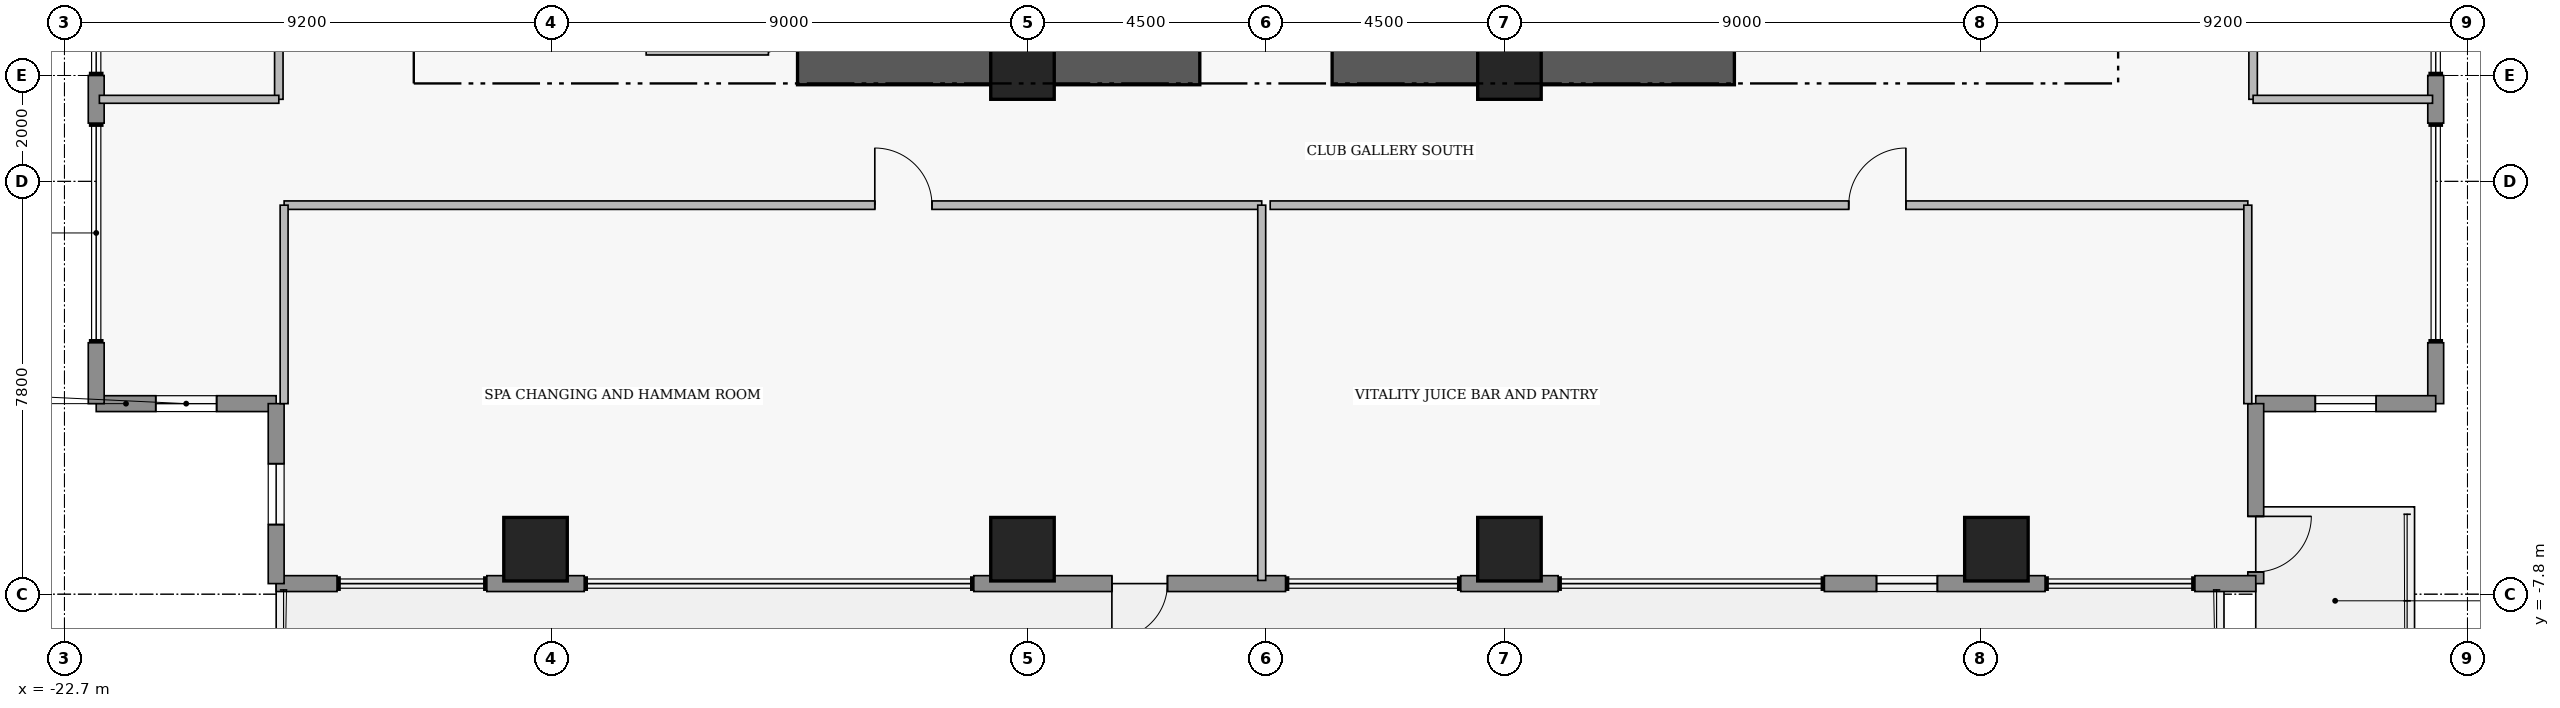
"""IFC4 building model, lengths in metres.
Left out: names, types, materials, properties, quantities, classifications, styles, units other than length and angle.
Written with IfcOpenShell. Run it as: python <this file> out.ifc"""

import sys

from ifc_helpers import new_model, si_unit, direction, frame, frame_2d, origin, origin_2d, place, context, subcontext, project, spatial, rectangle, extrude, element, fill, save


model = new_model("IFC4")
c1 = context("Model", 3, precision=1e-05, world=origin(), true_north=direction((0.0, 1.0)))
c2 = subcontext(c1, "Body", "Model", "MODEL_VIEW")
j1 = project(units=[si_unit("LENGTHUNIT", "METRE"), si_unit("PLANEANGLEUNIT", "RADIAN")], contexts=[c1])
p1 = place(None, origin())
s1 = spatial("IfcSite", under=j1, at=p1, CompositionType="ELEMENT")
p2 = place(p1, origin())
s2 = spatial("IfcBuilding", under=s1, at=p2, CompositionType="ELEMENT")
p3 = place(p2, frame((0.0, 0.0, 168.2)))
s3 = spatial("IfcBuildingStorey", under=s2, at=p3, CompositionType="ELEMENT", Elevation=168.2)
for number, where, z_axis, x_axis in (
    (1, (-8.85, 2.15, 0.0), (0.0, 0.0, 1.0), (1.0, 0.0, 0.0)),
    (2, (1.25, 2.15, 0.0), (0.0, 0.0, 1.0), (1.0, 0.0, 0.0)),
):
    element("IfcWall", number, at=place(p3, frame(where, z_axis=z_axis, x_axis=x_axis)), inside=s3, PredefinedType="SHEAR", context=c2, shape_type="SweptSolid", body=[
        extrude(rectangle(XDim=7.6, YDim=0.65, at=frame_2d((3.8, 0.0))), origin(), (0.0, 0.0, 1.0), 4.38),
    ])
for number, where, z_axis, x_axis in (
    (3, (-4.6, 2.15, 0.0), (0.0, 0.0, 1.0), (1.0, 0.0, 0.0)),
    (4, (4.6, 2.15, 0.0), (0.0, 0.0, 1.0), (1.0, 0.0, 0.0)),
):
    element("IfcColumn", number, at=place(p3, frame(where, z_axis=z_axis, x_axis=x_axis)), inside=s3, PredefinedType="COLUMN", context=c2, shape_type="SweptSolid", body=[
        extrude(rectangle(XDim=1.2, YDim=1.2, at=origin_2d()), origin(), (0.0, 0.0, 1.0), 4.6),
    ])
for number, where, z_axis, x_axis in (
    (5, (-13.8, -6.95, 0.43), (0.0, 0.0, 1.0), (1.0, 0.0, 0.0)),
    (6, (-4.6, -6.95, 0.43), (0.0, 0.0, 1.0), (1.0, 0.0, 0.0)),
    (7, (4.6, -6.95, 0.43), (0.0, 0.0, 1.0), (1.0, 0.0, 0.0)),
    (8, (13.8, -6.95, 0.43), (0.0, 0.0, 1.0), (1.0, 0.0, 0.0)),
):
    element("IfcColumn", number, at=place(p3, frame(where, z_axis=z_axis, x_axis=x_axis)), inside=s3, PredefinedType="COLUMN", context=c2, shape_type="SweptSolid", body=[
        extrude(rectangle(XDim=1.2, YDim=1.2, at=origin_2d()), origin(), (0.0, 0.0, 1.0), 4.17),
    ])
p4 = place(p3, frame((-18.7, -4.2, 0.0), z_axis=(0.0, 0.0, 1.0), x_axis=(-1.0, 0.0, 0.0)))
e9 = element("IfcWall", 9, at=p4, inside=s3, PredefinedType="STANDARD", context=c2, shape_type="SweptSolid", body=[
    extrude(rectangle(XDim=3.4, YDim=0.3, at=frame_2d((1.7, 0.0))), origin(), (0.0, 0.0, 1.0), 4.38),
])
p5 = place(p4, frame((1.125, 0.0, 1.25)))
e10 = element("IfcOpeningElement", 10, at=p5, cuts=e9, PredefinedType="OPENING", context=c2, shape_type="SweptSolid", body=[
    extrude(rectangle(XDim=1.15, YDim=1.55, at=frame_2d((0.575, 0.775))), frame((0.0, 0.16, 0.0), z_axis=(0.0, -1.0, 0.0), x_axis=(1.0, 0.0, 0.0)), (0.0, 0.0, 1.0), 0.32),
])
p6 = place(p3, frame((-22.1, -4.2, 0.0), z_axis=(0.0, 0.0, 1.0), x_axis=(0.0, 1.0, 0.0)))
e11 = element("IfcWall", 11, at=p6, inside=s3, PredefinedType="STANDARD", context=c2, shape_type="SweptSolid", body=[
    extrude(rectangle(XDim=1.15, YDim=0.3, at=frame_2d((0.575, 0.0))), origin(), (0.0, 0.0, 1.0), 4.38),
])
for number, where, z_axis, x_axis in (
    (12, (-22.1, 1.1, 0.0), (0.0, 0.0, 1.0), (0.0, 1.0, 0.0)),
    (13, (22.1, 2.0, 0.0), (0.0, 0.0, 1.0), (0.0, -1.0, 0.0)),
):
    element("IfcWall", number, at=place(p3, frame(where, z_axis=z_axis, x_axis=x_axis)), inside=s3, PredefinedType="STANDARD", context=c2, shape_type="SweptSolid", body=[
        extrude(rectangle(XDim=0.9, YDim=0.3, at=frame_2d((0.45, 0.0))), origin(), (0.0, 0.0, 1.0), 4.38),
    ])
p7 = place(p3, frame((22.1, -3.05, 0.0), z_axis=(0.0, 0.0, 1.0), x_axis=(0.0, -1.0, 0.0)))
e14 = element("IfcWall", 14, at=p7, inside=s3, PredefinedType="STANDARD", context=c2, shape_type="SweptSolid", body=[
    extrude(rectangle(XDim=1.15, YDim=0.3, at=frame_2d((0.575, 0.0))), origin(), (0.0, 0.0, 1.0), 4.38),
])
p8 = place(p3, frame((22.1, -4.2, 0.0), z_axis=(0.0, 0.0, 1.0), x_axis=(-1.0, 0.0, 0.0)))
e15 = element("IfcWall", 15, at=p8, inside=s3, PredefinedType="STANDARD", context=c2, shape_type="SweptSolid", body=[
    extrude(rectangle(XDim=3.4, YDim=0.3, at=frame_2d((1.7, 0.0))), origin(), (0.0, 0.0, 1.0), 4.38),
])
p9 = place(p8, frame((1.125, 0.0, 1.25)))
e16 = element("IfcOpeningElement", 16, at=p9, cuts=e15, PredefinedType="OPENING", context=c2, shape_type="SweptSolid", body=[
    extrude(rectangle(XDim=1.15, YDim=1.55, at=frame_2d((0.575, 0.775))), frame((0.0, 0.16, 0.0), z_axis=(0.0, -1.0, 0.0), x_axis=(1.0, 0.0, 0.0)), (0.0, 0.0, 1.0), 0.32),
])
p10 = place(p3, frame((18.7, -4.2, 0.0), z_axis=(0.0, 0.0, 1.0), x_axis=(0.0, -1.0, 0.0)))
e17 = element("IfcWall", 17, at=p10, inside=s3, PredefinedType="STANDARD", context=c2, shape_type="SweptSolid", body=[
    extrude(rectangle(XDim=3.4, YDim=0.3, at=frame_2d((1.7, 0.0))), origin(), (0.0, 0.0, 1.0), 4.38),
])
p11 = place(p10, frame((2.13, 0.0, 0.0)))
e18 = element("IfcOpeningElement", 18, at=p11, cuts=e17, PredefinedType="OPENING", context=c2, shape_type="SweptSolid", body=[
    extrude(rectangle(XDim=1.05, YDim=2.2, at=frame_2d((0.525, 1.1))), frame((0.0, 0.16, 0.0), z_axis=(0.0, -1.0, 0.0), x_axis=(1.0, 0.0, 0.0)), (0.0, 0.0, 1.0), 0.32),
])
p12 = place(p3, frame((18.7, -7.6, 0.0), z_axis=(0.0, 0.0, 1.0), x_axis=(-1.0, 0.0, 0.0)))
e19 = element("IfcWall", 19, at=p12, inside=s3, PredefinedType="STANDARD", context=c2, shape_type="SweptSolid", body=[
    extrude(rectangle(XDim=1.15, YDim=0.3, at=frame_2d((0.575, 0.0))), origin(), (0.0, 0.0, 1.0), 4.38),
])
p13 = place(p3, frame((14.72, -7.6, 0.0), z_axis=(0.0, 0.0, 1.0), x_axis=(-1.0, 0.0, 0.0)))
e20 = element("IfcWall", 20, at=p13, inside=s3, PredefinedType="STANDARD", context=c2, shape_type="SweptSolid", body=[
    extrude(rectangle(XDim=4.17, YDim=0.3, at=frame_2d((2.085, 0.0))), origin(), (0.0, 0.0, 1.0), 4.38),
])
p14 = place(p13, frame((2.035, 0.0, 0.95)))
e21 = element("IfcOpeningElement", 21, at=p14, cuts=e20, PredefinedType="OPENING", context=c2, shape_type="SweptSolid", body=[
    extrude(rectangle(XDim=1.15, YDim=1.55, at=frame_2d((0.575, 0.775))), frame((0.0, 0.16, 0.0), z_axis=(0.0, -1.0, 0.0), x_axis=(1.0, 0.0, 0.0)), (0.0, 0.0, 1.0), 0.32),
])
p15 = place(p3, frame((5.52, -7.6, 0.0), z_axis=(0.0, 0.0, 1.0), x_axis=(-1.0, 0.0, 0.0)))
e22 = element("IfcWall", 22, at=p15, inside=s3, PredefinedType="STANDARD", context=c2, shape_type="SweptSolid", body=[
    extrude(rectangle(XDim=1.84, YDim=0.3, at=frame_2d((0.92, 0.0))), origin(), (0.0, 0.0, 1.0), 4.38),
])
p16 = place(p3, frame((0.37, -7.6, 0.0), z_axis=(0.0, 0.0, 1.0), x_axis=(-1.0, 0.0, 0.0)))
e23 = element("IfcWall", 23, at=p16, inside=s3, PredefinedType="STANDARD", context=c2, shape_type="SweptSolid", body=[
    extrude(rectangle(XDim=5.89, YDim=0.3, at=frame_2d((2.945, 0.0))), origin(), (0.0, 0.0, 1.0), 4.38),
])
p17 = place(p16, frame((2.231, 0.0, 0.0)))
e24 = element("IfcOpeningElement", 24, at=p17, cuts=e23, PredefinedType="OPENING", context=c2, shape_type="SweptSolid", body=[
    extrude(rectangle(XDim=1.05, YDim=2.2, at=frame_2d((0.525, 1.1))), frame((0.0, 0.16, 0.0), z_axis=(0.0, -1.0, 0.0), x_axis=(1.0, 0.0, 0.0)), (0.0, 0.0, 1.0), 0.32),
])
p18 = place(p3, frame((-12.88, -7.6, 0.0), z_axis=(0.0, 0.0, 1.0), x_axis=(-1.0, 0.0, 0.0)))
e25 = element("IfcWall", 25, at=p18, inside=s3, PredefinedType="STANDARD", context=c2, shape_type="SweptSolid", body=[
    extrude(rectangle(XDim=1.84, YDim=0.3, at=frame_2d((0.92, 0.0))), origin(), (0.0, 0.0, 1.0), 4.38),
])
p19 = place(p3, frame((-17.55, -7.6, 0.0), z_axis=(0.0, 0.0, 1.0), x_axis=(-1.0, 0.0, 0.0)))
e26 = element("IfcWall", 26, at=p19, inside=s3, PredefinedType="STANDARD", context=c2, shape_type="SweptSolid", body=[
    extrude(rectangle(XDim=1.15, YDim=0.3, at=frame_2d((0.575, 0.0))), origin(), (0.0, 0.0, 1.0), 4.38),
])
p20 = place(p3, frame((-18.7, -7.6, 0.0), z_axis=(0.0, 0.0, 1.0), x_axis=(0.0, 1.0, 0.0)))
e27 = element("IfcWall", 27, at=p20, inside=s3, PredefinedType="STANDARD", context=c2, shape_type="SweptSolid", body=[
    extrude(rectangle(XDim=3.4, YDim=0.3, at=frame_2d((1.7, 0.0))), origin(), (0.0, 0.0, 1.0), 4.38),
])
p21 = place(p20, frame((1.115, 0.0, 1.25)))
e28 = element("IfcOpeningElement", 28, at=p21, cuts=e27, PredefinedType="OPENING", context=c2, shape_type="SweptSolid", body=[
    extrude(rectangle(XDim=1.15, YDim=1.55, at=frame_2d((0.575, 0.775))), frame((0.0, 0.16, 0.0), z_axis=(0.0, -1.0, 0.0), x_axis=(1.0, 0.0, 0.0)), (0.0, 0.0, 1.0), 0.32),
])
p22 = place(p3, frame((-18.65, 1.55, 0.0), z_axis=(0.0, 0.0, 1.0), x_axis=(0.0, 1.0, 0.0)))
e29 = element("IfcWall", 29, at=p22, inside=s3, PredefinedType="PARTITIONING", context=c2, shape_type="SweptSolid", body=[
    extrude(rectangle(XDim=15.05, YDim=0.16, at=frame_2d((7.525, 0.0))), origin(), (0.0, 0.0, 1.0), 4.38),
])
p23 = place(p22, frame((6.985, 0.0, 0.0)))
e30 = element("IfcOpeningElement", 30, at=p23, cuts=e29, PredefinedType="OPENING", context=c2, shape_type="SweptSolid", body=[
    extrude(rectangle(XDim=1.08, YDim=2.18, at=frame_2d((0.54, 1.09))), frame((0.0, 0.09, 0.0), z_axis=(0.0, -1.0, 0.0), x_axis=(1.0, 0.0, 0.0)), (0.0, 0.0, 1.0), 0.18),
])
p24 = place(p3, frame((18.65, 1.55, 0.0), z_axis=(0.0, 0.0, 1.0), x_axis=(0.0, 1.0, 0.0)))
e31 = element("IfcWall", 31, at=p24, inside=s3, PredefinedType="PARTITIONING", context=c2, shape_type="SweptSolid", body=[
    extrude(rectangle(XDim=15.05, YDim=0.16, at=frame_2d((7.525, 0.0))), origin(), (0.0, 0.0, 1.0), 4.38),
])
p25 = place(p24, frame((6.985, 0.0, 0.0)))
e32 = element("IfcOpeningElement", 32, at=p25, cuts=e31, PredefinedType="OPENING", context=c2, shape_type="SweptSolid", body=[
    extrude(rectangle(XDim=1.08, YDim=2.18, at=frame_2d((0.54, 1.09))), frame((0.0, 0.09, 0.0), z_axis=(0.0, -1.0, 0.0), x_axis=(1.0, 0.0, 0.0)), (0.0, 0.0, 1.0), 0.18),
])
p26 = place(p3, frame((-18.55, -0.45, 0.0), z_axis=(0.0, 0.0, 1.0), x_axis=(1.0, 0.0, 0.0)))
e33 = element("IfcWall", 33, at=p26, inside=s3, PredefinedType="PARTITIONING", context=c2, shape_type="SweptSolid", body=[
    extrude(rectangle(XDim=18.47, YDim=0.16, at=frame_2d((9.235, 0.0))), origin(), (0.0, 0.0, 1.0), 4.38),
])
p27 = place(p26, frame((11.16, 0.0, 0.0)))
e34 = element("IfcOpeningElement", 34, at=p27, cuts=e33, PredefinedType="OPENING", context=c2, shape_type="SweptSolid", body=[
    extrude(rectangle(XDim=1.08, YDim=2.18, at=frame_2d((0.54, 1.09))), frame((0.0, 0.09, 0.0), z_axis=(0.0, -1.0, 0.0), x_axis=(1.0, 0.0, 0.0)), (0.0, 0.0, 1.0), 0.18),
])
p28 = place(p3, frame((0.08, -0.45, 0.0), z_axis=(0.0, 0.0, 1.0), x_axis=(1.0, 0.0, 0.0)))
e35 = element("IfcWall", 35, at=p28, inside=s3, PredefinedType="PARTITIONING", context=c2, shape_type="SweptSolid", body=[
    extrude(rectangle(XDim=18.47, YDim=0.16, at=frame_2d((9.235, 0.0))), origin(), (0.0, 0.0, 1.0), 4.38),
])
p29 = place(p28, frame((10.93, 0.0, 0.0)))
e36 = element("IfcOpeningElement", 36, at=p29, cuts=e35, PredefinedType="OPENING", context=c2, shape_type="SweptSolid", body=[
    extrude(rectangle(XDim=1.08, YDim=2.18, at=frame_2d((0.54, 1.09))), frame((0.0, 0.09, 0.0), z_axis=(0.0, -1.0, 0.0), x_axis=(1.0, 0.0, 0.0)), (0.0, 0.0, 1.0), 0.18),
])
p30 = place(p3, frame((-11.71, 2.47, 0.0), z_axis=(0.0, 0.0, 1.0), x_axis=(1.0, 0.0, 0.0)))
e37 = element("IfcWall", 37, at=p30, inside=s3, PredefinedType="PARTITIONING", context=c2, shape_type="SweptSolid", body=[
    extrude(rectangle(XDim=2.31, YDim=0.165, at=frame_2d((1.155, 0.0))), origin(), (0.0, 0.0, 1.0), 3.28),
])
for number, where, z_axis, x_axis in (
    (38, (-22.04, 1.55, 0.0), (0.0, 0.0, 1.0), (1.0, 0.0, 0.0)),
    (39, (18.65, 1.55, 0.0), (0.0, 0.0, 1.0), (1.0, 0.0, 0.0)),
):
    element("IfcWall", number, at=place(p3, frame(where, z_axis=z_axis, x_axis=x_axis)), inside=s3, PredefinedType="PARTITIONING", context=c2, shape_type="SweptSolid", body=[
        extrude(rectangle(XDim=3.39, YDim=0.15, at=frame_2d((1.695, 0.0))), origin(), (0.0, 0.0, 1.0), 4.38),
    ])
p31 = place(p3, frame((-18.55, -4.2, 0.0), z_axis=(0.0, 0.0, 1.0), x_axis=(0.0, 1.0, 0.0)))
e40 = element("IfcWall", 40, at=p31, inside=s3, PredefinedType="PARTITIONING", context=c2, shape_type="SweptSolid", body=[
    extrude(rectangle(XDim=3.75, YDim=0.15, at=frame_2d((1.875, 0.0))), origin(), (0.0, 0.0, 1.0), 4.38),
])
p32 = place(p3, frame((-0.08, -7.54, 0.0), z_axis=(0.0, 0.0, 1.0), x_axis=(0.0, 1.0, 0.0)))
e41 = element("IfcWall", 41, at=p32, inside=s3, PredefinedType="PARTITIONING", context=c2, shape_type="SweptSolid", body=[
    extrude(rectangle(XDim=7.09, YDim=0.15, at=frame_2d((3.545, 0.0))), origin(), (0.0, 0.0, 1.0), 4.38),
])
p33 = place(p3, frame((18.55, -4.2, 0.0), z_axis=(0.0, 0.0, 1.0), x_axis=(0.0, 1.0, 0.0)))
e42 = element("IfcWall", 42, at=p33, inside=s3, PredefinedType="PARTITIONING", context=c2, shape_type="SweptSolid", body=[
    extrude(rectangle(XDim=3.75, YDim=0.15, at=frame_2d((1.875, 0.0))), origin(), (0.0, 0.0, 1.0), 4.38),
])
p34 = place(p5, origin())
e43 = element("IfcWindow", 43, at=p34, inside=s3, PartitioningType="SINGLE_PANEL", PredefinedType="WINDOW", context=c2, shape_type="SweptSolid", body=[
    extrude(rectangle(XDim=1.15, YDim=1.55, at=frame_2d((0.575, 0.775))), frame((0.0, 0.03, 0.0), z_axis=(0.0, -1.0, 0.0), x_axis=(1.0, 0.0, 0.0)), (0.0, 0.0, 1.0), 0.06),
])
fill(e10, e43)
p35 = place(p9, origin())
e44 = element("IfcWindow", 44, at=p35, inside=s3, PartitioningType="SINGLE_PANEL", PredefinedType="WINDOW", context=c2, shape_type="SweptSolid", body=[
    extrude(rectangle(XDim=1.15, YDim=1.55, at=frame_2d((0.575, 0.775))), frame((0.0, 0.03, 0.0), z_axis=(0.0, -1.0, 0.0), x_axis=(1.0, 0.0, 0.0)), (0.0, 0.0, 1.0), 0.06),
])
fill(e16, e44)
p36 = place(p11, origin())
e45 = element("IfcDoor", 45, at=p36, inside=s3, OperationType="SINGLE_SWING_LEFT", PredefinedType="DOOR", context=c2, shape_type="SweptSolid", body=[
    extrude(rectangle(XDim=1.05, YDim=2.2, at=frame_2d((0.525, 1.1))), frame((0.0, 0.025, 0.0), z_axis=(0.0, -1.0, 0.0), x_axis=(1.0, 0.0, 0.0)), (0.0, 0.0, 1.0), 0.05),
])
fill(e18, e45)
p37 = place(p14, origin())
e46 = element("IfcWindow", 46, at=p37, inside=s3, PartitioningType="SINGLE_PANEL", PredefinedType="WINDOW", context=c2, shape_type="SweptSolid", body=[
    extrude(rectangle(XDim=1.15, YDim=1.55, at=frame_2d((0.575, 0.775))), frame((0.0, 0.03, 0.0), z_axis=(0.0, -1.0, 0.0), x_axis=(1.0, 0.0, 0.0)), (0.0, 0.0, 1.0), 0.06),
])
fill(e21, e46)
p38 = place(p17, origin())
e47 = element("IfcDoor", 47, at=p38, inside=s3, OperationType="SINGLE_SWING_RIGHT", PredefinedType="DOOR", context=c2, shape_type="SweptSolid", body=[
    extrude(rectangle(XDim=1.05, YDim=2.2, at=frame_2d((0.525, 1.1))), frame((0.0, 0.025, 0.0), z_axis=(0.0, -1.0, 0.0), x_axis=(1.0, 0.0, 0.0)), (0.0, 0.0, 1.0), 0.05),
])
fill(e24, e47)
p39 = place(p21, origin())
e48 = element("IfcWindow", 48, at=p39, inside=s3, PartitioningType="SINGLE_PANEL", PredefinedType="WINDOW", context=c2, shape_type="SweptSolid", body=[
    extrude(rectangle(XDim=1.15, YDim=1.55, at=frame_2d((0.575, 0.775))), frame((0.0, 0.03, 0.0), z_axis=(0.0, -1.0, 0.0), x_axis=(1.0, 0.0, 0.0)), (0.0, 0.0, 1.0), 0.06),
])
fill(e28, e48)
p40 = place(p27, origin())
e49 = element("IfcDoor", 49, at=p40, inside=s3, OperationType="SINGLE_SWING_LEFT", PredefinedType="DOOR", context=c2, shape_type="SweptSolid", body=[
    extrude(rectangle(XDim=1.08, YDim=2.18, at=frame_2d((0.54, 1.09))), frame((0.0, 0.025, 0.0), z_axis=(0.0, -1.0, 0.0), x_axis=(1.0, 0.0, 0.0)), (0.0, 0.0, 1.0), 0.05),
])
fill(e34, e49)
p41 = place(p29, origin())
e50 = element("IfcDoor", 50, at=p41, inside=s3, OperationType="SINGLE_SWING_RIGHT", PredefinedType="DOOR", context=c2, shape_type="SweptSolid", body=[
    extrude(rectangle(XDim=1.08, YDim=2.18, at=frame_2d((0.54, 1.09))), frame((0.0, 0.025, 0.0), z_axis=(0.0, -1.0, 0.0), x_axis=(1.0, 0.0, 0.0)), (0.0, 0.0, 1.0), 0.05),
])
fill(e36, e50)
save(model, sys.argv[1])
